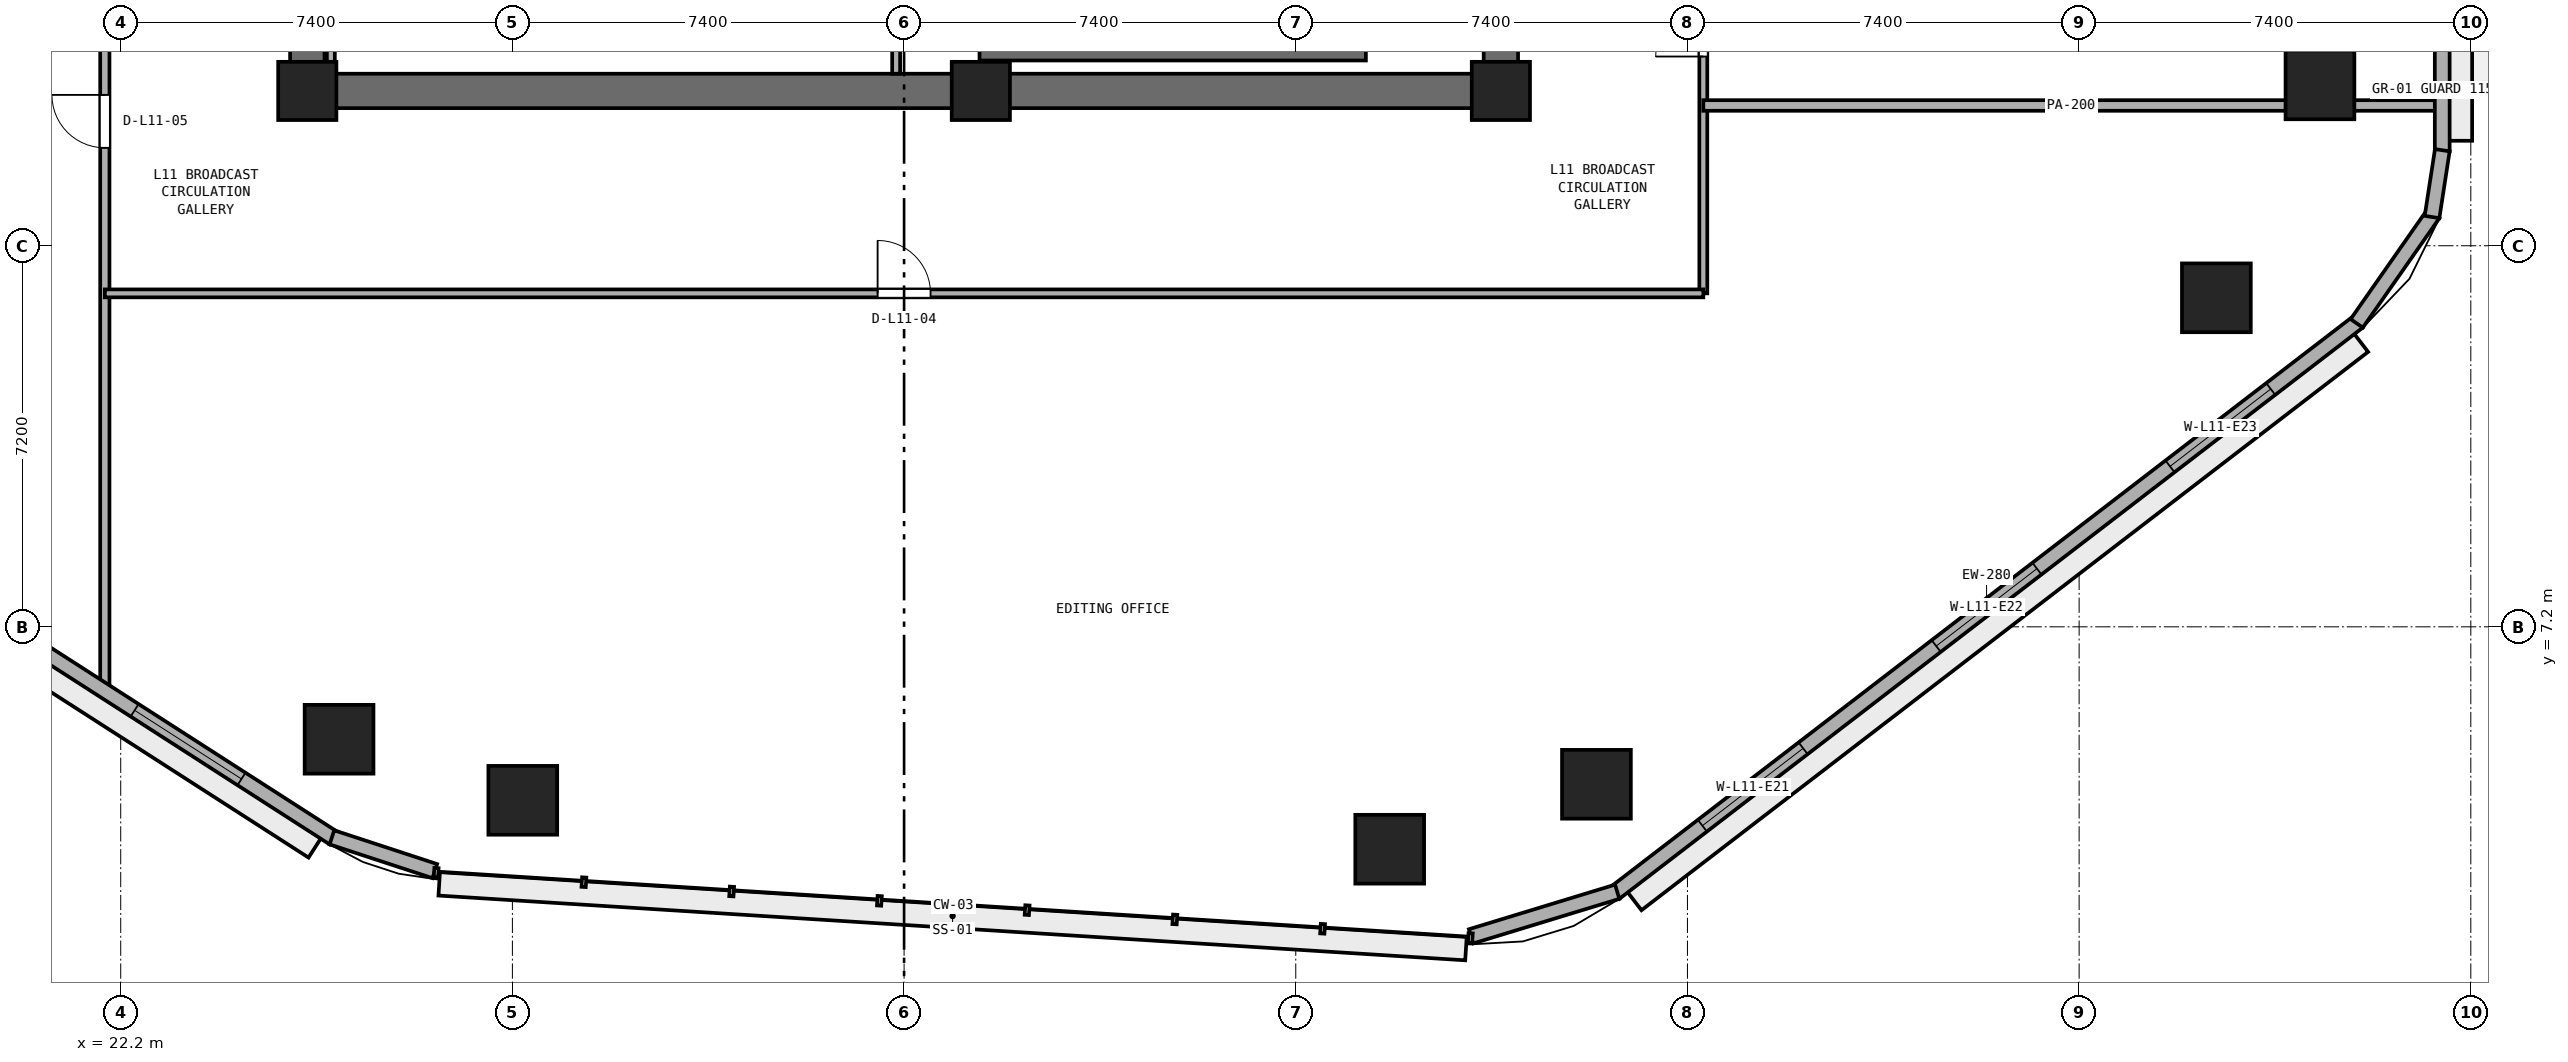
"""IFC4 building model, lengths in metres.
Left out: names, types, materials, properties, quantities, classifications, styles, units other than length and angle.
Written with IfcOpenShell. Run it as: python <this file> out.ifc"""

import sys

from ifc_helpers import new_model, si_unit, direction, frame, frame_2d, origin, origin_2d, place, context, subcontext, project, spatial, rectangle, extrude, element, fill, save


model = new_model("IFC4")
c1 = context("Model", 3, precision=1e-05, world=origin(), true_north=direction((0.0, 1.0)))
c2 = subcontext(c1, "Body", "Model", "MODEL_VIEW")
j1 = project(units=[si_unit("LENGTHUNIT", "METRE"), si_unit("PLANEANGLEUNIT", "RADIAN")], contexts=[c1])
p1 = place(None, origin())
s1 = spatial("IfcSite", under=j1, at=p1, CompositionType="ELEMENT")
p2 = place(p1, origin())
s2 = spatial("IfcBuilding", under=s1, at=p2, CompositionType="ELEMENT")
p3 = place(p2, frame((0.0, 0.0, 47.8)))
s3 = spatial("IfcBuildingStorey", under=s2, at=p3, CompositionType="ELEMENT", Elevation=47.8)
p4 = place(p3, frame((25.4, 17.325, 0.0), z_axis=(0.0, 0.0, 1.0), x_axis=(1.0, 0.0, 0.0)))
e1 = element("IfcWall", 1, at=p4, inside=s3, PredefinedType="SHEAR", context=c2, shape_type="SweptSolid", body=[
    extrude(rectangle(XDim=23.2, YDim=0.65, at=frame_2d((11.6, 0.0))), origin(), (0.0, 0.0, 1.0), 3.525),
])
p5 = place(p3, frame((25.725, 17.65, 0.0), z_axis=(0.0, 0.0, 1.0), x_axis=(0.0, 1.0, 0.0)))
e2 = element("IfcWall", 2, at=p5, inside=s3, PredefinedType="SHEAR", context=c2, shape_type="SweptSolid", body=[
    extrude(rectangle(XDim=15.1, YDim=0.65, at=frame_2d((7.55, 0.0))), origin(), (0.0, 0.0, 1.0), 3.525),
])
p6 = place(p5, frame((6.8, 0.0, 0.0)))
e3 = element("IfcOpeningElement", 3, at=p6, cuts=e2, PredefinedType="OPENING", context=c2, shape_type="SweptSolid", body=[
    extrude(rectangle(XDim=1.5, YDim=2.15, at=frame_2d((0.75, 1.075))), frame((0.0, 0.335, 0.0), z_axis=(0.0, -1.0, 0.0), x_axis=(1.0, 0.0, 0.0)), (0.0, 0.0, 1.0), 0.67),
])
p7 = place(p3, frame((48.275, 17.65, 0.0), z_axis=(0.0, 0.0, 1.0), x_axis=(0.0, 1.0, 0.0)))
e4 = element("IfcWall", 4, at=p7, inside=s3, PredefinedType="SHEAR", context=c2, shape_type="SweptSolid", body=[
    extrude(rectangle(XDim=15.1, YDim=0.65, at=frame_2d((7.55, 0.0))), origin(), (0.0, 0.0, 1.0), 3.525),
])
p8 = place(p7, frame((5.65, 0.0, 0.0)))
e5 = element("IfcOpeningElement", 5, at=p8, cuts=e4, PredefinedType="OPENING", context=c2, shape_type="SweptSolid", body=[
    extrude(rectangle(XDim=1.5, YDim=2.15, at=frame_2d((0.75, 1.075))), frame((0.0, 0.335, 0.0), z_axis=(0.0, -1.0, 0.0), x_axis=(1.0, 0.0, 0.0)), (0.0, 0.0, 1.0), 0.67),
])
for number, where, z_axis, x_axis in (
    (6, (25.725, 17.325, 0.0), (0.0, 0.0, 1.0), (1.0, 0.0, 0.0)),
    (7, (38.45, 17.325, 0.0), (0.0, 0.0, 1.0), (1.0, 0.0, 0.0)),
    (8, (48.275, 17.325, 0.0), (0.0, 0.0, 1.0), (1.0, 0.0, 0.0)),
):
    element("IfcColumn", number, at=place(p3, frame(where, z_axis=z_axis, x_axis=x_axis)), inside=s3, PredefinedType="PILASTER", context=c2, shape_type="SweptSolid", body=[
        extrude(rectangle(XDim=1.1, YDim=1.1, at=origin_2d()), origin(), (0.0, 0.0, 1.0), 3.8),
    ])
for number, where, z_axis, x_axis in (
    (9, (29.796, 3.922, 0.0), (0.0, 0.0, 1.0), (1.0, 0.0, 0.0)),
    (10, (46.175, 2.998, 0.0), (0.0, 0.0, 1.0), (1.0, 0.0, 0.0)),
    (11, (50.081, 4.225, 0.0), (0.0, 0.0, 1.0), (1.0, 0.0, 0.0)),
    (12, (61.793, 13.416, 0.0), (0.0, 0.0, 1.0), (1.0, 0.0, 0.0)),
    (13, (63.75, 17.44, 0.0), (0.0, 0.0, 1.0), (1.0, 0.0, 0.0)),
    (14, (26.325, 5.076, 0.0), (0.0, 0.0, 1.0), (1.0, 0.0, 0.0)),
):
    element("IfcColumn", number, at=place(p3, frame(where, z_axis=z_axis, x_axis=x_axis)), inside=s3, PredefinedType="COLUMN", context=c2, shape_type="SweptSolid", body=[
        extrude(rectangle(XDim=1.3, YDim=1.3, at=origin_2d()), origin(), (0.0, 0.0, 1.0), 3.8),
    ])
p9 = place(p3, frame((38.425, 18.025, 0.0), z_axis=(0.0, 0.0, 1.0), x_axis=(1.0, 0.0, 0.0)))
e15 = element("IfcWall", 15, at=p9, inside=s3, PredefinedType="SHEAR", context=c2, shape_type="SweptSolid", body=[
    extrude(rectangle(XDim=7.3, YDim=0.25, at=frame_2d((3.65, 0.0))), origin(), (0.0, 0.0, 1.0), 3.525),
])
for number, where, z_axis, x_axis in (
    (16, (26.17, 17.65, 0.0), (0.0, 0.0, 1.0), (0.0, 1.0, 0.0)),
    (17, (36.85, 17.65, 0.0), (0.0, 0.0, 1.0), (0.0, 1.0, 0.0)),
):
    element("IfcWall", number, at=place(p3, frame(where, z_axis=z_axis, x_axis=x_axis)), inside=s3, PredefinedType="PARTITIONING", context=c2, shape_type="SweptSolid", body=[
        extrude(rectangle(XDim=2.1, YDim=0.15, at=frame_2d((1.05, 0.0))), origin(), (0.0, 0.0, 1.0), 3.525),
    ])
p10 = place(p3, frame((52.1, 13.5, 0.0), z_axis=(0.0, 0.0, 1.0), x_axis=(0.0, 1.0, 0.0)))
e18 = element("IfcWall", 18, at=p10, inside=s3, PredefinedType="PARTITIONING", context=c2, shape_type="SweptSolid", body=[
    extrude(rectangle(XDim=33.723, YDim=0.15, at=frame_2d((16.861, 0.0))), origin(), (0.0, 0.0, 1.0), 3.525),
])
p11 = place(p10, frame((4.475, 0.0, 0.0)))
e19 = element("IfcOpeningElement", 19, at=p11, cuts=e18, PredefinedType="OPENING", context=c2, shape_type="SweptSolid", body=[
    extrude(rectangle(XDim=0.9, YDim=2.1, at=frame_2d((0.45, 1.05))), frame((0.0, 0.085, 0.0), z_axis=(0.0, -1.0, 0.0), x_axis=(1.0, 0.0, 0.0)), (0.0, 0.0, 1.0), 0.17),
])
p12 = place(p10, frame((9.85, 0.0, 0.0)))
e20 = element("IfcOpeningElement", 20, at=p12, cuts=e18, PredefinedType="OPENING", context=c2, shape_type="SweptSolid", body=[
    extrude(rectangle(XDim=0.9, YDim=2.1, at=frame_2d((0.45, 1.05))), frame((0.0, 0.085, 0.0), z_axis=(0.0, -1.0, 0.0), x_axis=(1.0, 0.0, 0.0)), (0.0, 0.0, 1.0), 0.17),
])
p13 = place(p10, frame((18.4, 0.0, 0.0)))
e21 = element("IfcOpeningElement", 21, at=p13, cuts=e18, PredefinedType="OPENING", context=c2, shape_type="SweptSolid", body=[
    extrude(rectangle(XDim=0.9, YDim=2.1, at=frame_2d((0.45, 1.05))), frame((0.0, 0.085, 0.0), z_axis=(0.0, -1.0, 0.0), x_axis=(1.0, 0.0, 0.0)), (0.0, 0.0, 1.0), 0.17),
])
p14 = place(p3, frame((21.9, 5.958, 0.0), z_axis=(0.0, 0.0, 1.0), x_axis=(0.0, 1.0, 0.0)))
e22 = element("IfcWall", 22, at=p14, inside=s3, PredefinedType="PARTITIONING", context=c2, shape_type="SweptSolid", body=[
    extrude(rectangle(XDim=30.942, YDim=0.175, at=frame_2d((15.471, 0.0))), origin(), (0.0, 0.0, 1.0), 3.525),
])
p15 = place(p14, frame((10.292, 0.0, 0.0)))
e23 = element("IfcOpeningElement", 23, at=p15, cuts=e22, PredefinedType="OPENING", context=c2, shape_type="SweptSolid", body=[
    extrude(rectangle(XDim=1.0, YDim=2.12, at=frame_2d((0.5, 1.06))), frame((0.0, 0.097, 0.0), z_axis=(0.0, -1.0, 0.0), x_axis=(1.0, 0.0, 0.0)), (0.0, 0.0, 1.0), 0.195),
])
p16 = place(p14, frame((16.842, 0.0, 0.0)))
e24 = element("IfcOpeningElement", 24, at=p16, cuts=e22, PredefinedType="OPENING", context=c2, shape_type="SweptSolid", body=[
    extrude(rectangle(XDim=1.0, YDim=2.12, at=frame_2d((0.5, 1.06))), frame((0.0, 0.097, 0.0), z_axis=(0.0, -1.0, 0.0), x_axis=(1.0, 0.0, 0.0)), (0.0, 0.0, 1.0), 0.195),
])
p17 = place(p14, frame((23.492, 0.0, 0.0)))
e25 = element("IfcOpeningElement", 25, at=p17, cuts=e22, PredefinedType="OPENING", context=c2, shape_type="SweptSolid", body=[
    extrude(rectangle(XDim=0.9, YDim=2.1, at=frame_2d((0.45, 1.05))), frame((0.0, 0.097, 0.0), z_axis=(0.0, -1.0, 0.0), x_axis=(1.0, 0.0, 0.0)), (0.0, 0.0, 1.0), 0.195),
])
p18 = place(p3, frame((21.9, 13.5, 0.0), z_axis=(0.0, 0.0, 1.0), x_axis=(1.0, 0.0, 0.0)))
e26 = element("IfcWall", 26, at=p18, inside=s3, PredefinedType="PARTITIONING", context=c2, shape_type="SweptSolid", body=[
    extrude(rectangle(XDim=30.2, YDim=0.15, at=frame_2d((15.1, 0.0))), origin(), (0.0, 0.0, 1.0), 3.525),
])
p19 = place(p18, frame((14.6, 0.0, 0.0)))
e27 = element("IfcOpeningElement", 27, at=p19, cuts=e26, PredefinedType="OPENING", context=c2, shape_type="SweptSolid", body=[
    extrude(rectangle(XDim=1.0, YDim=2.12, at=frame_2d((0.5, 1.06))), frame((0.0, 0.085, 0.0), z_axis=(0.0, -1.0, 0.0), x_axis=(1.0, 0.0, 0.0)), (0.0, 0.0, 1.0), 0.17),
])
p20 = place(p3, frame((52.1, 17.05, 0.0), z_axis=(0.0, 0.0, 1.0), x_axis=(1.0, 0.0, 0.0)))
e28 = element("IfcWall", 28, at=p20, inside=s3, PredefinedType="PARTITIONING", context=c2, shape_type="SweptSolid", body=[
    extrude(rectangle(XDim=13.895, YDim=0.2, at=frame_2d((6.948, 0.0))), origin(), (0.0, 0.0, 1.0), 3.525),
])
p21 = place(p3, frame((50.429, 2.172, 0.0), z_axis=(0.0, 0.0, 1.0), x_axis=(0.792937466367, 0.609303023488, 0.0)))
e29 = element("IfcWall", 29, at=p21, inside=s3, PredefinedType="STANDARD", context=c2, shape_type="SweptSolid", body=[
    extrude(rectangle(XDim=17.713, YDim=0.28, at=frame_2d((8.856, 0.0))), origin(), (0.0, 0.0, 1.0), 3.525),
])
p22 = place(p21, frame((2.085, 0.0, 0.9)))
e30 = element("IfcOpeningElement", 30, at=p22, cuts=e29, PredefinedType="OPENING", context=c2, shape_type="SweptSolid", body=[
    extrude(rectangle(XDim=2.4, YDim=1.75, at=frame_2d((1.2, 0.875))), frame((0.0, 0.15, 0.0), z_axis=(0.0, -1.0, 0.0), x_axis=(1.0, 0.0, 0.0)), (0.0, 0.0, 1.0), 0.3),
])
p23 = place(p21, frame((7.656, 0.0, 0.9)))
e31 = element("IfcOpeningElement", 31, at=p23, cuts=e29, PredefinedType="OPENING", context=c2, shape_type="SweptSolid", body=[
    extrude(rectangle(XDim=2.4, YDim=1.75, at=frame_2d((1.2, 0.875))), frame((0.0, 0.15, 0.0), z_axis=(0.0, -1.0, 0.0), x_axis=(1.0, 0.0, 0.0)), (0.0, 0.0, 1.0), 0.3),
])
p24 = place(p21, frame((13.227, 0.0, 0.9)))
e32 = element("IfcOpeningElement", 32, at=p24, cuts=e29, PredefinedType="OPENING", context=c2, shape_type="SweptSolid", body=[
    extrude(rectangle(XDim=2.4, YDim=1.75, at=frame_2d((1.2, 0.875))), frame((0.0, 0.15, 0.0), z_axis=(0.0, -1.0, 0.0), x_axis=(1.0, 0.0, 0.0)), (0.0, 0.0, 1.0), 0.3),
])
p25 = place(p3, frame((66.06, 16.183, 0.0), z_axis=(0.0, 0.0, 1.0), x_axis=(0.0, 1.0, 0.0)))
e33 = element("IfcWall", 33, at=p25, inside=s3, PredefinedType="STANDARD", context=c2, shape_type="SweptSolid", body=[
    extrude(rectangle(XDim=19.331, YDim=0.28, at=frame_2d((9.666, 0.0))), origin(), (0.0, 0.0, 1.0), 3.525),
])
p26 = place(p25, frame((9.115, 0.0, 0.0)))
e34 = element("IfcOpeningElement", 34, at=p26, cuts=e33, PredefinedType="OPENING", context=c2, shape_type="SweptSolid", body=[
    extrude(rectangle(XDim=1.1, YDim=2.2, at=frame_2d((0.55, 1.1))), frame((0.0, 0.15, 0.0), z_axis=(0.0, -1.0, 0.0), x_axis=(1.0, 0.0, 0.0)), (0.0, 0.0, 1.0), 0.3),
])
p27 = place(p25, frame((14.576, 0.0, 0.9)))
e35 = element("IfcOpeningElement", 35, at=p27, cuts=e33, PredefinedType="OPENING", context=c2, shape_type="SweptSolid", body=[
    extrude(rectangle(XDim=2.4, YDim=1.75, at=frame_2d((1.2, 0.875))), frame((0.0, 0.15, 0.0), z_axis=(0.0, -1.0, 0.0), x_axis=(1.0, 0.0, 0.0)), (0.0, 0.0, 1.0), 0.3),
])
p28 = place(p3, frame((11.405, 12.728, 0.0), z_axis=(0.0, 0.0, 1.0), x_axis=(0.841304564637, -0.540561402175, 0.0)))
e36 = element("IfcWall", 36, at=p28, inside=s3, PredefinedType="STANDARD", context=c2, shape_type="SweptSolid", body=[
    extrude(rectangle(XDim=17.612, YDim=0.28, at=frame_2d((8.806, 0.0))), origin(), (0.0, 0.0, 1.0), 3.525),
])
p29 = place(p28, frame((2.069, 0.0, 0.9)))
e37 = element("IfcOpeningElement", 37, at=p29, cuts=e36, PredefinedType="OPENING", context=c2, shape_type="SweptSolid", body=[
    extrude(rectangle(XDim=2.4, YDim=1.75, at=frame_2d((1.2, 0.875))), frame((0.0, 0.15, 0.0), z_axis=(0.0, -1.0, 0.0), x_axis=(1.0, 0.0, 0.0)), (0.0, 0.0, 1.0), 0.3),
])
p30 = place(p28, frame((7.606, 0.0, 0.9)))
e38 = element("IfcOpeningElement", 38, at=p30, cuts=e36, PredefinedType="OPENING", context=c2, shape_type="SweptSolid", body=[
    extrude(rectangle(XDim=2.4, YDim=1.75, at=frame_2d((1.2, 0.875))), frame((0.0, 0.15, 0.0), z_axis=(0.0, -1.0, 0.0), x_axis=(1.0, 0.0, 0.0)), (0.0, 0.0, 1.0), 0.3),
])
p31 = place(p28, frame((13.143, 0.0, 0.9)))
e39 = element("IfcOpeningElement", 39, at=p31, cuts=e36, PredefinedType="OPENING", context=c2, shape_type="SweptSolid", body=[
    extrude(rectangle(XDim=2.4, YDim=1.75, at=frame_2d((1.2, 0.875))), frame((0.0, 0.15, 0.0), z_axis=(0.0, -1.0, 0.0), x_axis=(1.0, 0.0, 0.0)), (0.0, 0.0, 1.0), 0.3),
])
p32 = place(p3, frame((47.712, 1.352, 0.0), z_axis=(0.0, 0.0, 1.0), x_axis=(0.956465727645, 0.291844670743, 0.0)))
e40 = element("IfcWall", 40, at=p32, inside=s3, PredefinedType="STANDARD", context=c2, shape_type="SweptSolid", body=[
    extrude(rectangle(XDim=2.887, YDim=0.28, at=frame_2d((1.443, 0.0))), origin(), (0.0, 0.0, 1.0), 3.525),
])
p33 = place(p3, frame((64.444, 12.933, 0.0), z_axis=(0.0, 0.0, 1.0), x_axis=(0.573176686443, 0.819431806875, 0.0)))
e41 = element("IfcWall", 41, at=p33, inside=s3, PredefinedType="STANDARD", context=c2, shape_type="SweptSolid", body=[
    extrude(rectangle(XDim=2.524, YDim=0.28, at=frame_2d((1.262, 0.0))), origin(), (0.0, 0.0, 1.0), 3.525),
])
p34 = place(p3, frame((65.867, 14.943, 0.0), z_axis=(0.0, 0.0, 1.0), x_axis=(0.152014078361, 0.988378328364, 0.0)))
e42 = element("IfcWall", 42, at=p34, inside=s3, PredefinedType="STANDARD", context=c2, shape_type="SweptSolid", body=[
    extrude(rectangle(XDim=1.277, YDim=0.28, at=frame_2d((0.638, 0.0))), origin(), (0.0, 0.0, 1.0), 3.525),
])
p35 = place(p3, frame((26.19, 3.223, 0.0), z_axis=(0.0, 0.0, 1.0), x_axis=(0.950175683881, -0.311714885371, 0.0)))
e43 = element("IfcWall", 43, at=p35, inside=s3, PredefinedType="STANDARD", context=c2, shape_type="SweptSolid", body=[
    extrude(rectangle(XDim=2.047, YDim=0.28, at=frame_2d((1.023, 0.0))), origin(), (0.0, 0.0, 1.0), 3.525),
])
p36 = place(p19, origin())
e44 = element("IfcDoor", 44, at=p36, inside=s3, OperationType="SINGLE_SWING_LEFT", PredefinedType="DOOR", context=c2, shape_type="SweptSolid", body=[
    extrude(rectangle(XDim=1.0, YDim=2.12, at=frame_2d((0.5, 1.06))), frame((0.0, 0.025, 0.0), z_axis=(0.0, -1.0, 0.0), x_axis=(1.0, 0.0, 0.0)), (0.0, 0.0, 1.0), 0.05),
])
fill(e27, e44)
p37 = place(p15, origin())
e45 = element("IfcDoor", 45, at=p37, inside=s3, OperationType="SINGLE_SWING_RIGHT", PredefinedType="DOOR", context=c2, shape_type="SweptSolid", body=[
    extrude(rectangle(XDim=1.0, YDim=2.12, at=frame_2d((0.5, 1.06))), frame((0.0, 0.025, 0.0), z_axis=(0.0, -1.0, 0.0), x_axis=(1.0, 0.0, 0.0)), (0.0, 0.0, 1.0), 0.05),
])
fill(e23, e45)
p38 = place(p11, origin())
e46 = element("IfcDoor", 46, at=p38, inside=s3, OperationType="SINGLE_SWING_LEFT", PredefinedType="DOOR", context=c2, shape_type="SweptSolid", body=[
    extrude(rectangle(XDim=0.9, YDim=2.1, at=frame_2d((0.45, 1.05))), frame((0.0, 0.025, 0.0), z_axis=(0.0, -1.0, 0.0), x_axis=(1.0, 0.0, 0.0)), (0.0, 0.0, 1.0), 0.05),
])
fill(e19, e46)
p39 = place(p22, origin())
e47 = element("IfcWindow", 47, at=p39, inside=s3, PartitioningType="SINGLE_PANEL", PredefinedType="WINDOW", context=c2, shape_type="SweptSolid", body=[
    extrude(rectangle(XDim=2.4, YDim=1.75, at=frame_2d((1.2, 0.875))), frame((0.0, 0.03, 0.0), z_axis=(0.0, -1.0, 0.0), x_axis=(1.0, 0.0, 0.0)), (0.0, 0.0, 1.0), 0.06),
])
fill(e30, e47)
p40 = place(p23, origin())
e48 = element("IfcWindow", 48, at=p40, inside=s3, PartitioningType="SINGLE_PANEL", PredefinedType="WINDOW", context=c2, shape_type="SweptSolid", body=[
    extrude(rectangle(XDim=2.4, YDim=1.75, at=frame_2d((1.2, 0.875))), frame((0.0, 0.03, 0.0), z_axis=(0.0, -1.0, 0.0), x_axis=(1.0, 0.0, 0.0)), (0.0, 0.0, 1.0), 0.06),
])
fill(e31, e48)
p41 = place(p24, origin())
e49 = element("IfcWindow", 49, at=p41, inside=s3, PartitioningType="SINGLE_PANEL", PredefinedType="WINDOW", context=c2, shape_type="SweptSolid", body=[
    extrude(rectangle(XDim=2.4, YDim=1.75, at=frame_2d((1.2, 0.875))), frame((0.0, 0.03, 0.0), z_axis=(0.0, -1.0, 0.0), x_axis=(1.0, 0.0, 0.0)), (0.0, 0.0, 1.0), 0.06),
])
fill(e32, e49)
p42 = place(p31, origin())
e50 = element("IfcWindow", 50, at=p42, inside=s3, PartitioningType="SINGLE_PANEL", PredefinedType="WINDOW", context=c2, shape_type="SweptSolid", body=[
    extrude(rectangle(XDim=2.4, YDim=1.75, at=frame_2d((1.2, 0.875))), frame((0.0, 0.03, 0.0), z_axis=(0.0, -1.0, 0.0), x_axis=(1.0, 0.0, 0.0)), (0.0, 0.0, 1.0), 0.06),
])
fill(e39, e50)
save(model, sys.argv[1])
